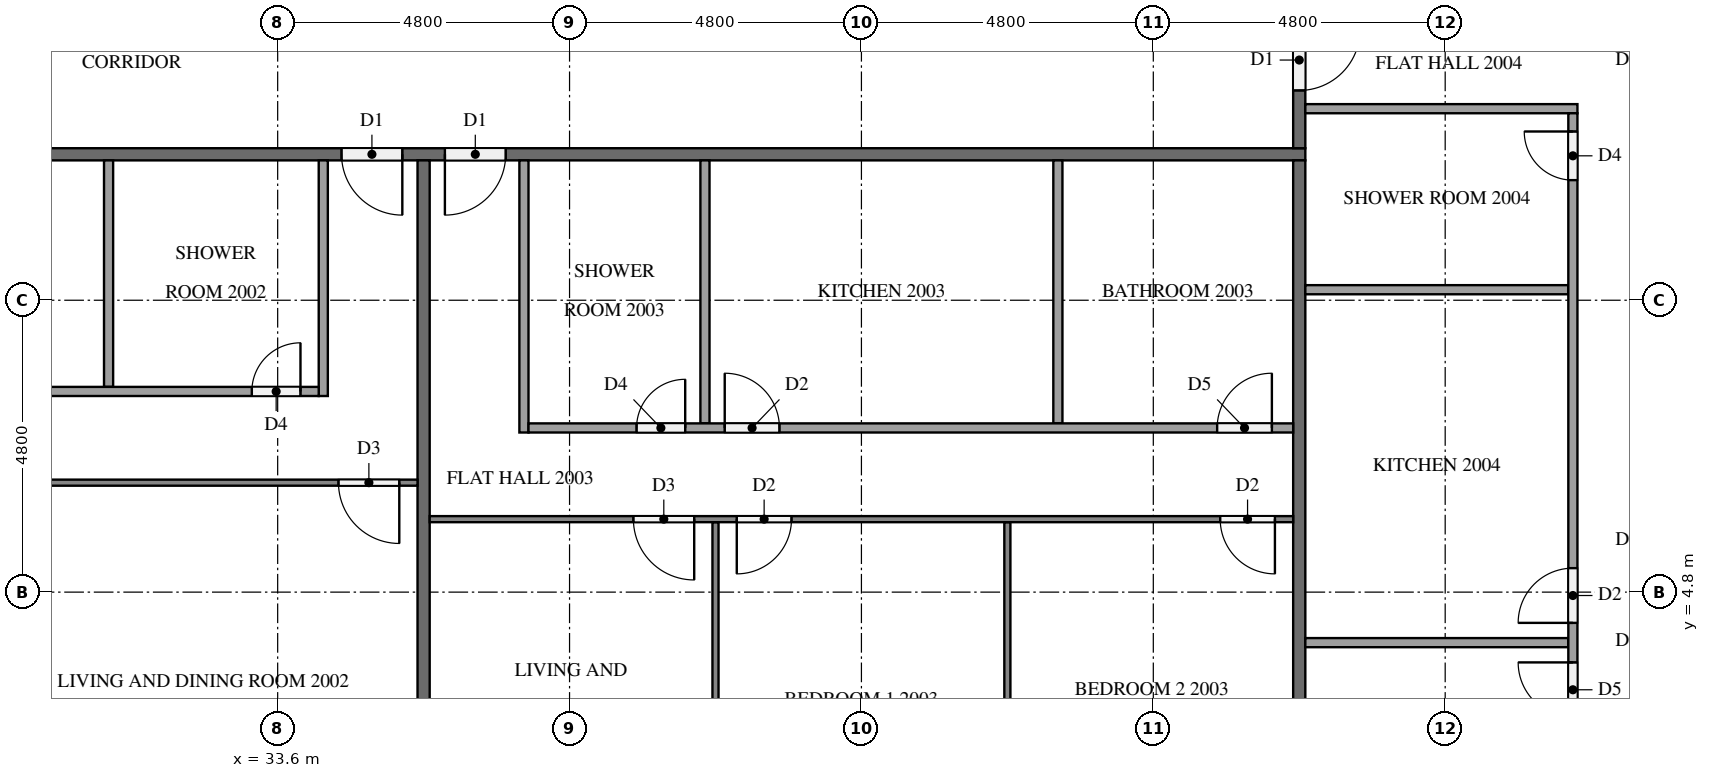
"""IFC4 building model, lengths in metres.
Left out: names, types, materials, properties, quantities, classifications, styles, units other than length and angle.
Written with IfcOpenShell. Run it as: python <this file> out.ifc"""

import sys

from ifc_helpers import new_model, si_unit, direction, frame, frame_2d, origin, place, context, subcontext, project, spatial, rectangle, extrude, element, fill, save


model = new_model("IFC4")
c1 = context("Model", 3, precision=1e-05, world=origin(), true_north=direction((0.0, 1.0)))
c2 = subcontext(c1, "Body", "Model", "MODEL_VIEW")
j1 = project(units=[si_unit("LENGTHUNIT", "METRE"), si_unit("PLANEANGLEUNIT", "RADIAN")], contexts=[c1])
p1 = place(None, origin())
s1 = spatial("IfcSite", under=j1, at=p1, CompositionType="ELEMENT")
p2 = place(p1, origin())
s2 = spatial("IfcBuilding", under=s1, at=p2, CompositionType="ELEMENT")
p3 = place(p2, frame((0.0, 0.0, 80.3)))
s3 = spatial("IfcBuildingStorey", under=s2, at=p3, CompositionType="ELEMENT", Elevation=80.3)
p4 = place(p3, frame((50.5, 12.0, 0.0), z_axis=(0.0, 0.0, 1.0), x_axis=(-1.0, 0.0, 0.0)))
e1 = element("IfcWall", 1, at=p4, inside=s3, PredefinedType="PARTITIONING", context=c2, shape_type="SweptSolid", body=[
    extrude(rectangle(XDim=38.6, YDim=0.2, at=frame_2d((19.3, 0.0))), origin(), (0.0, 0.0, 1.0), 3.1),
])
p5 = place(p4, frame((31.65, 0.0, 0.0)))
e2 = element("IfcOpeningElement", 2, at=p5, cuts=e1, PredefinedType="OPENING", context=c2, shape_type="SweptSolid", body=[
    extrude(rectangle(XDim=1.0, YDim=2.1, at=frame_2d((0.5, 1.05))), frame((0.0, 0.11, 0.0), z_axis=(0.0, -1.0, 0.0), x_axis=(1.0, 0.0, 0.0)), (0.0, 0.0, 1.0), 0.22),
])
p6 = place(p4, frame((14.85, 0.0, 0.0)))
e3 = element("IfcOpeningElement", 3, at=p6, cuts=e1, PredefinedType="OPENING", context=c2, shape_type="SweptSolid", body=[
    extrude(rectangle(XDim=1.0, YDim=2.1, at=frame_2d((0.5, 1.05))), frame((0.0, 0.11, 0.0), z_axis=(0.0, -1.0, 0.0), x_axis=(1.0, 0.0, 0.0)), (0.0, 0.0, 1.0), 0.22),
])
p7 = place(p4, frame((13.15, 0.0, 0.0)))
e4 = element("IfcOpeningElement", 4, at=p7, cuts=e1, PredefinedType="OPENING", context=c2, shape_type="SweptSolid", body=[
    extrude(rectangle(XDim=1.0, YDim=2.1, at=frame_2d((0.5, 1.05))), frame((0.0, 0.11, 0.0), z_axis=(0.0, -1.0, 0.0), x_axis=(1.0, 0.0, 0.0)), (0.0, 0.0, 1.0), 0.22),
])
p8 = place(p3, frame((50.4, 40.7, 0.0), z_axis=(0.0, 0.0, 1.0), x_axis=(0.0, -1.0, 0.0)))
e5 = element("IfcWall", 5, at=p8, inside=s3, PredefinedType="PARTITIONING", context=c2, shape_type="SweptSolid", body=[
    extrude(rectangle(XDim=28.6, YDim=0.2, at=frame_2d((14.3, 0.0))), origin(), (0.0, 0.0, 1.0), 3.1),
])
p9 = place(p8, frame((26.65, 0.0, 0.0)))
e6 = element("IfcOpeningElement", 6, at=p9, cuts=e5, PredefinedType="OPENING", context=c2, shape_type="SweptSolid", body=[
    extrude(rectangle(XDim=1.0, YDim=2.1, at=frame_2d((0.5, 1.05))), frame((0.0, 0.11, 0.0), z_axis=(0.0, -1.0, 0.0), x_axis=(1.0, 0.0, 0.0)), (0.0, 0.0, 1.0), 0.22),
])
p10 = place(p8, frame((9.85, 0.0, 0.0)))
e7 = element("IfcOpeningElement", 7, at=p10, cuts=e5, PredefinedType="OPENING", context=c2, shape_type="SweptSolid", body=[
    extrude(rectangle(XDim=1.0, YDim=2.1, at=frame_2d((0.5, 1.05))), frame((0.0, 0.11, 0.0), z_axis=(0.0, -1.0, 0.0), x_axis=(1.0, 0.0, 0.0)), (0.0, 0.0, 1.0), 0.22),
])
p11 = place(p8, frame((2.65, 0.0, 0.0)))
e8 = element("IfcOpeningElement", 8, at=p11, cuts=e5, PredefinedType="OPENING", context=c2, shape_type="SweptSolid", body=[
    extrude(rectangle(XDim=1.0, YDim=2.1, at=frame_2d((0.5, 1.05))), frame((0.0, 0.11, 0.0), z_axis=(0.0, -1.0, 0.0), x_axis=(1.0, 0.0, 0.0)), (0.0, 0.0, 1.0), 0.22),
])
p12 = place(p8, frame((0.95, 0.0, 0.0)))
e9 = element("IfcOpeningElement", 9, at=p12, cuts=e5, PredefinedType="OPENING", context=c2, shape_type="SweptSolid", body=[
    extrude(rectangle(XDim=1.0, YDim=2.1, at=frame_2d((0.5, 1.05))), frame((0.0, 0.11, 0.0), z_axis=(0.0, -1.0, 0.0), x_axis=(1.0, 0.0, 0.0)), (0.0, 0.0, 1.0), 0.22),
])
for number, where, z_axis, x_axis in (
    (10, (36.0, 11.9, 0.0), (0.0, 0.0, 1.0), (0.0, -1.0, 0.0)),
    (11, (50.4, 11.9, 0.0), (0.0, 0.0, 1.0), (0.0, -1.0, 0.0)),
):
    element("IfcWall", number, at=place(p3, frame(where, z_axis=z_axis, x_axis=x_axis)), inside=s3, PredefinedType="PARTITIONING", context=c2, shape_type="SweptSolid", body=[
        extrude(rectangle(XDim=11.8, YDim=0.2, at=frame_2d((5.9, 0.0))), origin(), (0.0, 0.0, 1.0), 3.1),
    ])
p13 = place(p3, frame((35.9, 6.6, 0.0), z_axis=(0.0, 0.0, 1.0), x_axis=(-1.0, 0.0, 0.0)))
e12 = element("IfcWall", 12, at=p13, inside=s3, PredefinedType="PARTITIONING", context=c2, shape_type="SweptSolid", body=[
    extrude(rectangle(XDim=16.6, YDim=0.1, at=frame_2d((8.3, 0.0))), origin(), (0.0, 0.0, 1.0), 3.1),
])
p14 = place(p13, frame((0.3, 0.0, 0.0)))
e13 = element("IfcOpeningElement", 13, at=p14, cuts=e12, PredefinedType="OPENING", context=c2, shape_type="SweptSolid", body=[
    extrude(rectangle(XDim=1.0, YDim=2.1, at=frame_2d((0.5, 1.05))), frame((0.0, 0.06, 0.0), z_axis=(0.0, -1.0, 0.0), x_axis=(1.0, 0.0, 0.0)), (0.0, 0.0, 1.0), 0.12),
])
p15 = place(p13, frame((10.65, 0.0, 0.0)))
e14 = element("IfcOpeningElement", 14, at=p15, cuts=e12, PredefinedType="OPENING", context=c2, shape_type="SweptSolid", body=[
    extrude(rectangle(XDim=0.9, YDim=2.1, at=frame_2d((0.45, 1.05))), frame((0.0, 0.06, 0.0), z_axis=(0.0, -1.0, 0.0), x_axis=(1.0, 0.0, 0.0)), (0.0, 0.0, 1.0), 0.12),
])
p16 = place(p13, frame((12.25, 0.0, 0.0)))
e15 = element("IfcOpeningElement", 15, at=p16, cuts=e12, PredefinedType="OPENING", context=c2, shape_type="SweptSolid", body=[
    extrude(rectangle(XDim=0.9, YDim=2.1, at=frame_2d((0.45, 1.05))), frame((0.0, 0.06, 0.0), z_axis=(0.0, -1.0, 0.0), x_axis=(1.0, 0.0, 0.0)), (0.0, 0.0, 1.0), 0.12),
])
p17 = place(p3, frame((30.819, 11.9, 0.0), z_axis=(0.0, 0.0, 1.0), x_axis=(0.0, -1.0, 0.0)))
e16 = element("IfcWall", 16, at=p17, inside=s3, PredefinedType="PARTITIONING", context=c2, shape_type="SweptSolid", body=[
    extrude(rectangle(XDim=3.725, YDim=0.15, at=frame_2d((1.862, 0.0))), origin(), (0.0, 0.0, 1.0), 3.1),
])
p18 = place(p3, frame((34.35, 11.9, 0.0), z_axis=(0.0, 0.0, 1.0), x_axis=(0.0, -1.0, 0.0)))
e17 = element("IfcWall", 17, at=p18, inside=s3, PredefinedType="PARTITIONING", context=c2, shape_type="SweptSolid", body=[
    extrude(rectangle(XDim=3.875, YDim=0.15, at=frame_2d((1.938, 0.0))), origin(), (0.0, 0.0, 1.0), 3.1),
])
p19 = place(p3, frame((19.3, 8.1, 0.0), z_axis=(0.0, 0.0, 1.0), x_axis=(1.0, 0.0, 0.0)))
e18 = element("IfcWall", 18, at=p19, inside=s3, PredefinedType="PARTITIONING", context=c2, shape_type="SweptSolid", body=[
    extrude(rectangle(XDim=14.975, YDim=0.15, at=frame_2d((7.487, 0.0))), origin(), (0.0, 0.0, 1.0), 3.1),
])
p20 = place(p19, frame((13.875, 0.0, 0.0)))
e19 = element("IfcOpeningElement", 19, at=p20, cuts=e18, PredefinedType="OPENING", context=c2, shape_type="SweptSolid", body=[
    extrude(rectangle(XDim=0.8, YDim=2.1, at=frame_2d((0.4, 1.05))), frame((0.0, 0.085, 0.0), z_axis=(0.0, -1.0, 0.0), x_axis=(1.0, 0.0, 0.0)), (0.0, 0.0, 1.0), 0.17),
])
p21 = place(p19, frame((4.933, 0.0, 0.0)))
e20 = element("IfcOpeningElement", 20, at=p21, cuts=e18, PredefinedType="OPENING", context=c2, shape_type="SweptSolid", body=[
    extrude(rectangle(XDim=0.9, YDim=2.1, at=frame_2d((0.45, 1.05))), frame((0.0, 0.085, 0.0), z_axis=(0.0, -1.0, 0.0), x_axis=(1.0, 0.0, 0.0)), (0.0, 0.0, 1.0), 0.17),
])
p22 = place(p19, frame((3.383, 0.0, 0.0)))
e21 = element("IfcOpeningElement", 21, at=p22, cuts=e18, PredefinedType="OPENING", context=c2, shape_type="SweptSolid", body=[
    extrude(rectangle(XDim=0.9, YDim=2.1, at=frame_2d((0.45, 1.05))), frame((0.0, 0.085, 0.0), z_axis=(0.0, -1.0, 0.0), x_axis=(1.0, 0.0, 0.0)), (0.0, 0.0, 1.0), 0.17),
])
for number, where, z_axis, x_axis in (
    (22, (40.8, 5.95, 0.0), (0.0, 0.0, 1.0), (0.0, -1.0, 0.0)),
    (23, (45.6, 5.95, 0.0), (0.0, 0.0, 1.0), (0.0, -1.0, 0.0)),
):
    element("IfcWall", number, at=place(p3, frame(where, z_axis=z_axis, x_axis=x_axis)), inside=s3, PredefinedType="PARTITIONING", context=c2, shape_type="SweptSolid", body=[
        extrude(rectangle(XDim=5.85, YDim=0.1, at=frame_2d((2.925, 0.0))), origin(), (0.0, 0.0, 1.0), 3.1),
    ])
p23 = place(p3, frame((50.3, 6.0, 0.0), z_axis=(0.0, 0.0, 1.0), x_axis=(-1.0, 0.0, 0.0)))
e24 = element("IfcWall", 24, at=p23, inside=s3, PredefinedType="PARTITIONING", context=c2, shape_type="SweptSolid", body=[
    extrude(rectangle(XDim=14.2, YDim=0.1, at=frame_2d((7.1, 0.0))), origin(), (0.0, 0.0, 1.0), 3.1),
])
p24 = place(p23, frame((9.85, 0.0, 0.0)))
e25 = element("IfcOpeningElement", 25, at=p24, cuts=e24, PredefinedType="OPENING", context=c2, shape_type="SweptSolid", body=[
    extrude(rectangle(XDim=1.0, YDim=2.1, at=frame_2d((0.5, 1.05))), frame((0.0, 0.06, 0.0), z_axis=(0.0, -1.0, 0.0), x_axis=(1.0, 0.0, 0.0)), (0.0, 0.0, 1.0), 0.12),
])
p25 = place(p23, frame((8.25, 0.0, 0.0)))
e26 = element("IfcOpeningElement", 26, at=p25, cuts=e24, PredefinedType="OPENING", context=c2, shape_type="SweptSolid", body=[
    extrude(rectangle(XDim=0.9, YDim=2.1, at=frame_2d((0.45, 1.05))), frame((0.0, 0.06, 0.0), z_axis=(0.0, -1.0, 0.0), x_axis=(1.0, 0.0, 0.0)), (0.0, 0.0, 1.0), 0.12),
])
p26 = place(p23, frame((0.3, 0.0, 0.0)))
e27 = element("IfcOpeningElement", 27, at=p26, cuts=e24, PredefinedType="OPENING", context=c2, shape_type="SweptSolid", body=[
    extrude(rectangle(XDim=0.9, YDim=2.1, at=frame_2d((0.45, 1.05))), frame((0.0, 0.06, 0.0), z_axis=(0.0, -1.0, 0.0), x_axis=(1.0, 0.0, 0.0)), (0.0, 0.0, 1.0), 0.12),
])
for number, where, z_axis, x_axis in (
    (28, (40.627, 11.9, 0.0), (0.0, 0.0, 1.0), (0.0, -1.0, 0.0)),
    (29, (46.431, 11.9, 0.0), (0.0, 0.0, 1.0), (0.0, -1.0, 0.0)),
):
    element("IfcWall", number, at=place(p3, frame(where, z_axis=z_axis, x_axis=x_axis)), inside=s3, PredefinedType="PARTITIONING", context=c2, shape_type="SweptSolid", body=[
        extrude(rectangle(XDim=4.325, YDim=0.15, at=frame_2d((2.163, 0.0))), origin(), (0.0, 0.0, 1.0), 3.1),
    ])
p27 = place(p3, frame((37.65, 11.9, 0.0), z_axis=(0.0, 0.0, 1.0), x_axis=(0.0, -1.0, 0.0)))
e30 = element("IfcWall", 30, at=p27, inside=s3, PredefinedType="PARTITIONING", context=c2, shape_type="SweptSolid", body=[
    extrude(rectangle(XDim=4.475, YDim=0.15, at=frame_2d((2.237, 0.0))), origin(), (0.0, 0.0, 1.0), 3.1),
])
p28 = place(p3, frame((37.725, 7.5, 0.0), z_axis=(0.0, 0.0, 1.0), x_axis=(1.0, 0.0, 0.0)))
e31 = element("IfcWall", 31, at=p28, inside=s3, PredefinedType="PARTITIONING", context=c2, shape_type="SweptSolid", body=[
    extrude(rectangle(XDim=12.575, YDim=0.15, at=frame_2d((6.288, 0.0))), origin(), (0.0, 0.0, 1.0), 3.1),
])
p29 = place(p28, frame((1.777, 0.0, 0.0)))
e32 = element("IfcOpeningElement", 32, at=p29, cuts=e31, PredefinedType="OPENING", context=c2, shape_type="SweptSolid", body=[
    extrude(rectangle(XDim=0.8, YDim=2.1, at=frame_2d((0.4, 1.05))), frame((0.0, 0.085, 0.0), z_axis=(0.0, -1.0, 0.0), x_axis=(1.0, 0.0, 0.0)), (0.0, 0.0, 1.0), 0.17),
])
p30 = place(p28, frame((3.227, 0.0, 0.0)))
e33 = element("IfcOpeningElement", 33, at=p30, cuts=e31, PredefinedType="OPENING", context=c2, shape_type="SweptSolid", body=[
    extrude(rectangle(XDim=0.9, YDim=2.1, at=frame_2d((0.45, 1.05))), frame((0.0, 0.085, 0.0), z_axis=(0.0, -1.0, 0.0), x_axis=(1.0, 0.0, 0.0)), (0.0, 0.0, 1.0), 0.17),
])
p31 = place(p28, frame((11.325, 0.0, 0.0)))
e34 = element("IfcOpeningElement", 34, at=p31, cuts=e31, PredefinedType="OPENING", context=c2, shape_type="SweptSolid", body=[
    extrude(rectangle(XDim=0.9, YDim=2.1, at=frame_2d((0.45, 1.05))), frame((0.0, 0.085, 0.0), z_axis=(0.0, -1.0, 0.0), x_axis=(1.0, 0.0, 0.0)), (0.0, 0.0, 1.0), 0.17),
])
for number, where, z_axis, x_axis in (
    (35, (50.5, 9.773, 0.0), (0.0, 0.0, 1.0), (1.0, 0.0, 0.0)),
    (36, (50.5, 3.969, 0.0), (0.0, 0.0, 1.0), (1.0, 0.0, 0.0)),
):
    element("IfcWall", number, at=place(p3, frame(where, z_axis=z_axis, x_axis=x_axis)), inside=s3, PredefinedType="PARTITIONING", context=c2, shape_type="SweptSolid", body=[
        extrude(rectangle(XDim=4.325, YDim=0.15, at=frame_2d((2.163, 0.0))), origin(), (0.0, 0.0, 1.0), 3.1),
    ])
p32 = place(p3, frame((50.5, 12.75, 0.0), z_axis=(0.0, 0.0, 1.0), x_axis=(1.0, 0.0, 0.0)))
e37 = element("IfcWall", 37, at=p32, inside=s3, PredefinedType="PARTITIONING", context=c2, shape_type="SweptSolid", body=[
    extrude(rectangle(XDim=4.475, YDim=0.15, at=frame_2d((2.238, 0.0))), origin(), (0.0, 0.0, 1.0), 3.1),
])
p33 = place(p3, frame((54.9, 0.1, 0.0), z_axis=(0.0, 0.0, 1.0), x_axis=(0.0, 1.0, 0.0)))
e38 = element("IfcWall", 38, at=p33, inside=s3, PredefinedType="PARTITIONING", context=c2, shape_type="SweptSolid", body=[
    extrude(rectangle(XDim=12.575, YDim=0.15, at=frame_2d((6.288, 0.0))), origin(), (0.0, 0.0, 1.0), 3.1),
])
p34 = place(p33, frame((11.475, 0.0, 0.0)))
e39 = element("IfcOpeningElement", 39, at=p34, cuts=e38, PredefinedType="OPENING", context=c2, shape_type="SweptSolid", body=[
    extrude(rectangle(XDim=0.8, YDim=2.1, at=frame_2d((0.4, 1.05))), frame((0.0, 0.085, 0.0), z_axis=(0.0, -1.0, 0.0), x_axis=(1.0, 0.0, 0.0)), (0.0, 0.0, 1.0), 0.17),
])
p35 = place(p33, frame((4.194, 0.0, 0.0)))
e40 = element("IfcOpeningElement", 40, at=p35, cuts=e38, PredefinedType="OPENING", context=c2, shape_type="SweptSolid", body=[
    extrude(rectangle(XDim=0.9, YDim=2.1, at=frame_2d((0.45, 1.05))), frame((0.0, 0.085, 0.0), z_axis=(0.0, -1.0, 0.0), x_axis=(1.0, 0.0, 0.0)), (0.0, 0.0, 1.0), 0.17),
])
p36 = place(p33, frame((2.644, 0.0, 0.0)))
e41 = element("IfcOpeningElement", 41, at=p36, cuts=e38, PredefinedType="OPENING", context=c2, shape_type="SweptSolid", body=[
    extrude(rectangle(XDim=0.9, YDim=2.1, at=frame_2d((0.45, 1.05))), frame((0.0, 0.085, 0.0), z_axis=(0.0, -1.0, 0.0), x_axis=(1.0, 0.0, 0.0)), (0.0, 0.0, 1.0), 0.17),
])
p37 = place(p6, origin())
e42 = element("IfcDoor", 42, at=p37, inside=s3, OperationType="SINGLE_SWING_LEFT", PredefinedType="DOOR", context=c2, shape_type="SweptSolid", body=[
    extrude(rectangle(XDim=1.0, YDim=2.1, at=frame_2d((0.5, 1.05))), frame((0.0, 0.025, 0.0), z_axis=(0.0, -1.0, 0.0), x_axis=(1.0, 0.0, 0.0)), (0.0, 0.0, 1.0), 0.05),
])
fill(e3, e42)
p38 = place(p7, origin())
e43 = element("IfcDoor", 43, at=p38, inside=s3, OperationType="SINGLE_SWING_RIGHT", PredefinedType="DOOR", context=c2, shape_type="SweptSolid", body=[
    extrude(rectangle(XDim=1.0, YDim=2.1, at=frame_2d((0.5, 1.05))), frame((0.0, 0.025, 0.0), z_axis=(0.0, -1.0, 0.0), x_axis=(1.0, 0.0, 0.0)), (0.0, 0.0, 1.0), 0.05),
])
fill(e4, e43)
p39 = place(p9, origin())
e44 = element("IfcDoor", 44, at=p39, inside=s3, OperationType="SINGLE_SWING_LEFT", PredefinedType="DOOR", context=c2, shape_type="SweptSolid", body=[
    extrude(rectangle(XDim=1.0, YDim=2.1, at=frame_2d((0.5, 1.05))), frame((0.0, 0.025, 0.0), z_axis=(0.0, -1.0, 0.0), x_axis=(1.0, 0.0, 0.0)), (0.0, 0.0, 1.0), 0.05),
])
fill(e6, e44)
p40 = place(p14, origin())
e45 = element("IfcDoor", 45, at=p40, inside=s3, OperationType="SINGLE_SWING_LEFT", PredefinedType="DOOR", context=c2, shape_type="SweptSolid", body=[
    extrude(rectangle(XDim=1.0, YDim=2.1, at=frame_2d((0.5, 1.05))), frame((0.0, 0.025, 0.0), z_axis=(0.0, -1.0, 0.0), x_axis=(1.0, 0.0, 0.0)), (0.0, 0.0, 1.0), 0.05),
])
fill(e13, e45)
p41 = place(p20, origin())
e46 = element("IfcDoor", 46, at=p41, inside=s3, OperationType="SINGLE_SWING_RIGHT", PredefinedType="DOOR", context=c2, shape_type="SweptSolid", body=[
    extrude(rectangle(XDim=0.8, YDim=2.1, at=frame_2d((0.4, 1.05))), frame((0.0, 0.025, 0.0), z_axis=(0.0, -1.0, 0.0), x_axis=(1.0, 0.0, 0.0)), (0.0, 0.0, 1.0), 0.05),
])
fill(e19, e46)
p42 = place(p24, origin())
e47 = element("IfcDoor", 47, at=p42, inside=s3, OperationType="SINGLE_SWING_LEFT", PredefinedType="DOOR", context=c2, shape_type="SweptSolid", body=[
    extrude(rectangle(XDim=1.0, YDim=2.1, at=frame_2d((0.5, 1.05))), frame((0.0, 0.025, 0.0), z_axis=(0.0, -1.0, 0.0), x_axis=(1.0, 0.0, 0.0)), (0.0, 0.0, 1.0), 0.05),
])
fill(e25, e47)
p43 = place(p25, origin())
e48 = element("IfcDoor", 48, at=p43, inside=s3, OperationType="SINGLE_SWING_RIGHT", PredefinedType="DOOR", context=c2, shape_type="SweptSolid", body=[
    extrude(rectangle(XDim=0.9, YDim=2.1, at=frame_2d((0.45, 1.05))), frame((0.0, 0.025, 0.0), z_axis=(0.0, -1.0, 0.0), x_axis=(1.0, 0.0, 0.0)), (0.0, 0.0, 1.0), 0.05),
])
fill(e26, e48)
p44 = place(p26, origin())
e49 = element("IfcDoor", 49, at=p44, inside=s3, OperationType="SINGLE_SWING_LEFT", PredefinedType="DOOR", context=c2, shape_type="SweptSolid", body=[
    extrude(rectangle(XDim=0.9, YDim=2.1, at=frame_2d((0.45, 1.05))), frame((0.0, 0.025, 0.0), z_axis=(0.0, -1.0, 0.0), x_axis=(1.0, 0.0, 0.0)), (0.0, 0.0, 1.0), 0.05),
])
fill(e27, e49)
p45 = place(p29, origin())
e50 = element("IfcDoor", 50, at=p45, inside=s3, OperationType="SINGLE_SWING_RIGHT", PredefinedType="DOOR", context=c2, shape_type="SweptSolid", body=[
    extrude(rectangle(XDim=0.8, YDim=2.1, at=frame_2d((0.4, 1.05))), frame((0.0, 0.025, 0.0), z_axis=(0.0, -1.0, 0.0), x_axis=(1.0, 0.0, 0.0)), (0.0, 0.0, 1.0), 0.05),
])
fill(e32, e50)
p46 = place(p30, origin())
e51 = element("IfcDoor", 51, at=p46, inside=s3, OperationType="SINGLE_SWING_LEFT", PredefinedType="DOOR", context=c2, shape_type="SweptSolid", body=[
    extrude(rectangle(XDim=0.9, YDim=2.1, at=frame_2d((0.45, 1.05))), frame((0.0, 0.025, 0.0), z_axis=(0.0, -1.0, 0.0), x_axis=(1.0, 0.0, 0.0)), (0.0, 0.0, 1.0), 0.05),
])
fill(e33, e51)
p47 = place(p31, origin())
e52 = element("IfcDoor", 52, at=p47, inside=s3, OperationType="SINGLE_SWING_RIGHT", PredefinedType="DOOR", context=c2, shape_type="SweptSolid", body=[
    extrude(rectangle(XDim=0.9, YDim=2.1, at=frame_2d((0.45, 1.05))), frame((0.0, 0.025, 0.0), z_axis=(0.0, -1.0, 0.0), x_axis=(1.0, 0.0, 0.0)), (0.0, 0.0, 1.0), 0.05),
])
fill(e34, e52)
p48 = place(p34, origin())
e53 = element("IfcDoor", 53, at=p48, inside=s3, OperationType="SINGLE_SWING_RIGHT", PredefinedType="DOOR", context=c2, shape_type="SweptSolid", body=[
    extrude(rectangle(XDim=0.8, YDim=2.1, at=frame_2d((0.4, 1.05))), frame((0.0, 0.025, 0.0), z_axis=(0.0, -1.0, 0.0), x_axis=(1.0, 0.0, 0.0)), (0.0, 0.0, 1.0), 0.05),
])
fill(e39, e53)
p49 = place(p35, origin())
e54 = element("IfcDoor", 54, at=p49, inside=s3, OperationType="SINGLE_SWING_LEFT", PredefinedType="DOOR", context=c2, shape_type="SweptSolid", body=[
    extrude(rectangle(XDim=0.9, YDim=2.1, at=frame_2d((0.45, 1.05))), frame((0.0, 0.025, 0.0), z_axis=(0.0, -1.0, 0.0), x_axis=(1.0, 0.0, 0.0)), (0.0, 0.0, 1.0), 0.05),
])
fill(e40, e54)
p50 = place(p36, origin())
e55 = element("IfcDoor", 55, at=p50, inside=s3, OperationType="SINGLE_SWING_RIGHT", PredefinedType="DOOR", context=c2, shape_type="SweptSolid", body=[
    extrude(rectangle(XDim=0.9, YDim=2.1, at=frame_2d((0.45, 1.05))), frame((0.0, 0.025, 0.0), z_axis=(0.0, -1.0, 0.0), x_axis=(1.0, 0.0, 0.0)), (0.0, 0.0, 1.0), 0.05),
])
fill(e41, e55)
save(model, sys.argv[1])
